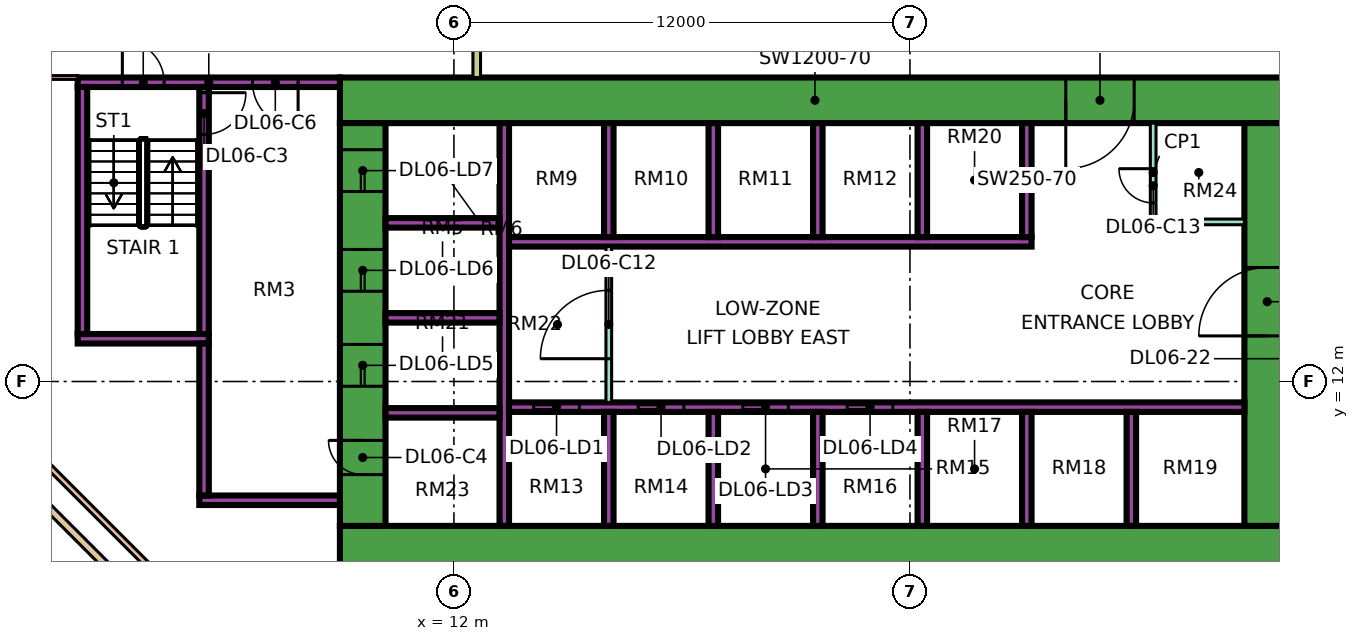
"""IFC4 building model, lengths in metres.
Left out: names, types, materials, properties, quantities, classifications, styles, units other than length and angle.
Written with IfcOpenShell. Run it as: python <this file> out.ifc"""

import sys

from ifc_helpers import new_model, si_unit, direction, frame, frame_2d, origin, place, context, subcontext, project, spatial, rectangle, extrude, element, fill, save


model = new_model("IFC4")
c1 = context("Model", 3, precision=1e-05, world=origin(), true_north=direction((0.0, 1.0)))
c2 = subcontext(c1, "Body", "Model", "MODEL_VIEW")
j1 = project(units=[si_unit("LENGTHUNIT", "METRE"), si_unit("PLANEANGLEUNIT", "RADIAN")], contexts=[c1])
p1 = place(None, origin())
s1 = spatial("IfcSite", under=j1, at=p1, CompositionType="ELEMENT")
p2 = place(p1, origin())
s2 = spatial("IfcBuilding", under=s1, at=p2, CompositionType="ELEMENT")
p3 = place(p2, frame((0.0, 0.0, 35.4)))
s3 = spatial("IfcBuildingStorey", under=s2, at=p3, CompositionType="ELEMENT", Elevation=35.4)
p4 = place(p3, frame((9.0, 7.6, 0.0), z_axis=(0.0, 0.0, 1.0), x_axis=(1.0, 0.0, 0.0)))
e1 = element("IfcWall", 1, at=p4, inside=s3, PredefinedType="SHEAR", context=c2, shape_type="SweptSolid", body=[
    extrude(rectangle(XDim=25.0, YDim=1.2, at=frame_2d((12.5, 0.0))), origin(), (0.0, 0.0, 1.0), 6.0),
])
p5 = place(p3, frame((9.0, 19.4, 0.0), z_axis=(0.0, 0.0, 1.0), x_axis=(1.0, 0.0, 0.0)))
e2 = element("IfcWall", 2, at=p5, inside=s3, PredefinedType="SHEAR", context=c2, shape_type="SweptSolid", body=[
    extrude(rectangle(XDim=25.0, YDim=1.2, at=frame_2d((12.5, 0.0))), origin(), (0.0, 0.0, 1.0), 6.0),
])
p6 = place(p5, frame((19.1, 0.0, 0.0)))
e3 = element("IfcOpeningElement", 3, at=p6, cuts=e2, PredefinedType="OPENING", context=c2, shape_type="SweptSolid", body=[
    extrude(rectangle(XDim=1.8, YDim=2.4, at=frame_2d((0.9, 1.2))), frame((0.0, 0.61, 0.0), z_axis=(0.0, -1.0, 0.0), x_axis=(1.0, 0.0, 0.0)), (0.0, 0.0, 1.0), 1.22),
])
p7 = place(p3, frame((9.6, 8.2, 0.0), z_axis=(0.0, 0.0, 1.0), x_axis=(0.0, 1.0, 0.0)))
e4 = element("IfcWall", 4, at=p7, inside=s3, PredefinedType="SHEAR", context=c2, shape_type="SweptSolid", body=[
    extrude(rectangle(XDim=10.6, YDim=1.2, at=frame_2d((5.3, 0.0))), origin(), (0.0, 0.0, 1.0), 6.0),
])
p8 = place(p7, frame((3.675, 0.0, 0.0)))
e5 = element("IfcOpeningElement", 5, at=p8, cuts=e4, PredefinedType="OPENING", context=c2, shape_type="SweptSolid", body=[
    extrude(rectangle(XDim=1.1, YDim=2.2, at=frame_2d((0.55, 1.1))), frame((0.0, 0.61, 0.0), z_axis=(0.0, -1.0, 0.0), x_axis=(1.0, 0.0, 0.0)), (0.0, 0.0, 1.0), 1.22),
])
p9 = place(p7, frame((6.175, 0.0, 0.0)))
e6 = element("IfcOpeningElement", 6, at=p9, cuts=e4, PredefinedType="OPENING", context=c2, shape_type="SweptSolid", body=[
    extrude(rectangle(XDim=1.1, YDim=2.2, at=frame_2d((0.55, 1.1))), frame((0.0, 0.61, 0.0), z_axis=(0.0, -1.0, 0.0), x_axis=(1.0, 0.0, 0.0)), (0.0, 0.0, 1.0), 1.22),
])
p10 = place(p7, frame((8.8, 0.0, 0.0)))
e7 = element("IfcOpeningElement", 7, at=p10, cuts=e4, PredefinedType="OPENING", context=c2, shape_type="SweptSolid", body=[
    extrude(rectangle(XDim=1.1, YDim=2.2, at=frame_2d((0.55, 1.1))), frame((0.0, 0.61, 0.0), z_axis=(0.0, -1.0, 0.0), x_axis=(1.0, 0.0, 0.0)), (0.0, 0.0, 1.0), 1.22),
])
p11 = place(p7, frame((1.35, 0.0, 0.0)))
e8 = element("IfcOpeningElement", 8, at=p11, cuts=e4, PredefinedType="OPENING", context=c2, shape_type="SweptSolid", body=[
    extrude(rectangle(XDim=0.9, YDim=2.1, at=frame_2d((0.45, 1.05))), frame((0.0, 0.61, 0.0), z_axis=(0.0, -1.0, 0.0), x_axis=(1.0, 0.0, 0.0)), (0.0, 0.0, 1.0), 1.22),
])
p12 = place(p3, frame((33.4, 8.2, 0.0), z_axis=(0.0, 0.0, 1.0), x_axis=(0.0, 1.0, 0.0)))
e9 = element("IfcWall", 9, at=p12, inside=s3, PredefinedType="SHEAR", context=c2, shape_type="SweptSolid", body=[
    extrude(rectangle(XDim=10.6, YDim=1.2, at=frame_2d((5.3, 0.0))), origin(), (0.0, 0.0, 1.0), 6.0),
])
p13 = place(p12, frame((5.0, 0.0, 0.0)))
e10 = element("IfcOpeningElement", 10, at=p13, cuts=e9, PredefinedType="OPENING", context=c2, shape_type="SweptSolid", body=[
    extrude(rectangle(XDim=1.8, YDim=2.4, at=frame_2d((0.9, 1.2))), frame((0.0, 0.61, 0.0), z_axis=(0.0, -1.0, 0.0), x_axis=(1.0, 0.0, 0.0)), (0.0, 0.0, 1.0), 1.22),
])
p14 = place(p3, frame((13.325, 8.2, 0.0), z_axis=(0.0, 0.0, 1.0), x_axis=(0.0, 1.0, 0.0)))
e11 = element("IfcWall", 11, at=p14, inside=s3, PredefinedType="SHEAR", context=c2, shape_type="SweptSolid", body=[
    extrude(rectangle(XDim=10.6, YDim=0.25, at=frame_2d((5.3, 0.0))), origin(), (0.0, 0.0, 1.0), 6.0),
])
p15 = place(p3, frame((13.45, 11.325, 0.0), z_axis=(0.0, 0.0, 1.0), x_axis=(1.0, 0.0, 0.0)))
e12 = element("IfcWall", 12, at=p15, inside=s3, PredefinedType="SHEAR", context=c2, shape_type="SweptSolid", body=[
    extrude(rectangle(XDim=19.35, YDim=0.25, at=frame_2d((9.675, 0.0))), origin(), (0.0, 0.0, 1.0), 6.0),
])
p16 = place(p15, frame((0.65, 0.0, 0.0)))
e13 = element("IfcOpeningElement", 13, at=p16, cuts=e12, PredefinedType="OPENING", context=c2, shape_type="SweptSolid", body=[
    extrude(rectangle(XDim=1.2, YDim=2.2, at=frame_2d((0.6, 1.1))), frame((0.0, 0.135, 0.0), z_axis=(0.0, -1.0, 0.0), x_axis=(1.0, 0.0, 0.0)), (0.0, 0.0, 1.0), 0.27),
])
p17 = place(p15, frame((3.4, 0.0, 0.0)))
e14 = element("IfcOpeningElement", 14, at=p17, cuts=e12, PredefinedType="OPENING", context=c2, shape_type="SweptSolid", body=[
    extrude(rectangle(XDim=1.2, YDim=2.2, at=frame_2d((0.6, 1.1))), frame((0.0, 0.135, 0.0), z_axis=(0.0, -1.0, 0.0), x_axis=(1.0, 0.0, 0.0)), (0.0, 0.0, 1.0), 0.27),
])
p18 = place(p15, frame((6.15, 0.0, 0.0)))
e15 = element("IfcOpeningElement", 15, at=p18, cuts=e12, PredefinedType="OPENING", context=c2, shape_type="SweptSolid", body=[
    extrude(rectangle(XDim=1.2, YDim=2.2, at=frame_2d((0.6, 1.1))), frame((0.0, 0.135, 0.0), z_axis=(0.0, -1.0, 0.0), x_axis=(1.0, 0.0, 0.0)), (0.0, 0.0, 1.0), 0.27),
])
p19 = place(p15, frame((8.9, 0.0, 0.0)))
e16 = element("IfcOpeningElement", 16, at=p19, cuts=e12, PredefinedType="OPENING", context=c2, shape_type="SweptSolid", body=[
    extrude(rectangle(XDim=1.2, YDim=2.2, at=frame_2d((0.6, 1.1))), frame((0.0, 0.135, 0.0), z_axis=(0.0, -1.0, 0.0), x_axis=(1.0, 0.0, 0.0)), (0.0, 0.0, 1.0), 0.27),
])
p20 = place(p3, frame((13.45, 15.675, 0.0), z_axis=(0.0, 0.0, 1.0), x_axis=(1.0, 0.0, 0.0)))
e17 = element("IfcWall", 17, at=p20, inside=s3, PredefinedType="SHEAR", context=c2, shape_type="SweptSolid", body=[
    extrude(rectangle(XDim=13.75, YDim=0.25, at=frame_2d((6.875, 0.0))), origin(), (0.0, 0.0, 1.0), 6.0),
])
for number, where, z_axis, x_axis in (
    (18, (10.2, 11.175, 0.0), (0.0, 0.0, 1.0), (1.0, 0.0, 0.0)),
    (19, (10.2, 13.675, 0.0), (0.0, 0.0, 1.0), (1.0, 0.0, 0.0)),
    (20, (10.2, 16.175, 0.0), (0.0, 0.0, 1.0), (1.0, 0.0, 0.0)),
    (21, (16.075, 8.2, 0.0), (0.0, 0.0, 1.0), (0.0, 1.0, 0.0)),
    (22, (18.825, 8.2, 0.0), (0.0, 0.0, 1.0), (0.0, 1.0, 0.0)),
    (23, (21.575, 8.2, 0.0), (0.0, 0.0, 1.0), (0.0, 1.0, 0.0)),
    (24, (24.325, 8.2, 0.0), (0.0, 0.0, 1.0), (0.0, 1.0, 0.0)),
    (25, (27.075, 8.2, 0.0), (0.0, 0.0, 1.0), (0.0, 1.0, 0.0)),
    (26, (29.825, 8.2, 0.0), (0.0, 0.0, 1.0), (0.0, 1.0, 0.0)),
    (27, (16.075, 15.8, 0.0), (0.0, 0.0, 1.0), (0.0, 1.0, 0.0)),
    (28, (18.825, 15.8, 0.0), (0.0, 0.0, 1.0), (0.0, 1.0, 0.0)),
    (29, (21.575, 15.8, 0.0), (0.0, 0.0, 1.0), (0.0, 1.0, 0.0)),
    (30, (24.325, 15.8, 0.0), (0.0, 0.0, 1.0), (0.0, 1.0, 0.0)),
    (31, (27.075, 15.8, 0.0), (0.0, 0.0, 1.0), (0.0, 1.0, 0.0)),
):
    element("IfcWall", number, at=place(p3, frame(where, z_axis=z_axis, x_axis=x_axis)), inside=s3, PredefinedType="SHEAR", context=c2, shape_type="SweptSolid", body=[
        extrude(rectangle(XDim=3.0, YDim=0.25, at=frame_2d((1.5, 0.0))), origin(), (0.0, 0.0, 1.0), 6.0),
    ])
p21 = place(p3, frame((2.1, 19.875, 0.0), z_axis=(0.0, 0.0, 1.0), x_axis=(1.0, 0.0, 0.0)))
e32 = element("IfcWall", 32, at=p21, inside=s3, PredefinedType="SHEAR", context=c2, shape_type="SweptSolid", body=[
    extrude(rectangle(XDim=6.9, YDim=0.25, at=frame_2d((3.45, 0.0))), origin(), (0.0, 0.0, 1.0), 6.0),
])
p22 = place(p21, frame((1.175, 0.0, 0.0)))
e33 = element("IfcOpeningElement", 33, at=p22, cuts=e32, PredefinedType="OPENING", context=c2, shape_type="SweptSolid", body=[
    extrude(rectangle(XDim=1.1, YDim=2.2, at=frame_2d((0.55, 1.1))), frame((0.0, 0.135, 0.0), z_axis=(0.0, -1.0, 0.0), x_axis=(1.0, 0.0, 0.0)), (0.0, 0.0, 1.0), 0.27),
])
p23 = place(p21, frame((4.6, 0.0, 0.0)))
e34 = element("IfcOpeningElement", 34, at=p23, cuts=e32, PredefinedType="OPENING", context=c2, shape_type="SweptSolid", body=[
    extrude(rectangle(XDim=1.2, YDim=2.2, at=frame_2d((0.6, 1.1))), frame((0.0, 0.135, 0.0), z_axis=(0.0, -1.0, 0.0), x_axis=(1.0, 0.0, 0.0)), (0.0, 0.0, 1.0), 0.27),
])
p24 = place(p3, frame((2.1, 13.125, 0.0), z_axis=(0.0, 0.0, 1.0), x_axis=(1.0, 0.0, 0.0)))
e35 = element("IfcWall", 35, at=p24, inside=s3, PredefinedType="SHEAR", context=c2, shape_type="SweptSolid", body=[
    extrude(rectangle(XDim=3.45, YDim=0.25, at=frame_2d((1.725, 0.0))), origin(), (0.0, 0.0, 1.0), 6.0),
])
p25 = place(p3, frame((2.225, 13.25, 0.0), z_axis=(0.0, 0.0, 1.0), x_axis=(0.0, 1.0, 0.0)))
e36 = element("IfcWall", 36, at=p25, inside=s3, PredefinedType="SHEAR", context=c2, shape_type="SweptSolid", body=[
    extrude(rectangle(XDim=6.5, YDim=0.25, at=frame_2d((3.25, 0.0))), origin(), (0.0, 0.0, 1.0), 6.0),
])
p26 = place(p3, frame((5.425, 13.25, 0.0), z_axis=(0.0, 0.0, 1.0), x_axis=(0.0, 1.0, 0.0)))
e37 = element("IfcWall", 37, at=p26, inside=s3, PredefinedType="SHEAR", context=c2, shape_type="SweptSolid", body=[
    extrude(rectangle(XDim=6.5, YDim=0.25, at=frame_2d((3.25, 0.0))), origin(), (0.0, 0.0, 1.0), 6.0),
])
p27 = place(p26, frame((5.25, 0.0, 0.0)))
e38 = element("IfcOpeningElement", 38, at=p27, cuts=e37, PredefinedType="OPENING", context=c2, shape_type="SweptSolid", body=[
    extrude(rectangle(XDim=1.1, YDim=2.2, at=frame_2d((0.55, 1.1))), frame((0.0, 0.135, 0.0), z_axis=(0.0, -1.0, 0.0), x_axis=(1.0, 0.0, 0.0)), (0.0, 0.0, 1.0), 0.27),
])
p28 = place(p3, frame((5.3, 8.875, 0.0), z_axis=(0.0, 0.0, 1.0), x_axis=(1.0, 0.0, 0.0)))
e39 = element("IfcWall", 39, at=p28, inside=s3, PredefinedType="SHEAR", context=c2, shape_type="SweptSolid", body=[
    extrude(rectangle(XDim=3.7, YDim=0.25, at=frame_2d((1.85, 0.0))), origin(), (0.0, 0.0, 1.0), 6.0),
])
p29 = place(p3, frame((5.425, 9.0, 0.0), z_axis=(0.0, 0.0, 1.0), x_axis=(0.0, 1.0, 0.0)))
e40 = element("IfcWall", 40, at=p29, inside=s3, PredefinedType="SHEAR", context=c2, shape_type="SweptSolid", body=[
    extrude(rectangle(XDim=4.0, YDim=0.25, at=frame_2d((2.0, 0.0))), origin(), (0.0, 0.0, 1.0), 6.0),
])
p30 = place(p3, frame((-1.447, 12.553, 0.0), z_axis=(0.0, 0.0, 1.0), x_axis=(0.707106781187, -0.707106781187, 0.0)))
e41 = element("IfcWall", 41, at=p30, inside=s3, PredefinedType="SOLIDWALL", context=c2, shape_type="SweptSolid", body=[
    extrude(rectangle(XDim=19.799, YDim=0.15, at=frame_2d((9.899, 0.0))), origin(), (0.0, 0.0, 1.0), 5.6),
])
p31 = place(p30, frame((8.399, 0.0, 0.45)))
e42 = element("IfcOpeningElement", 42, at=p31, cuts=e41, PredefinedType="OPENING", context=c2, shape_type="SweptSolid", body=[
    extrude(rectangle(XDim=3.0, YDim=3.6, at=frame_2d((1.5, 1.8))), frame((0.0, 0.085, 0.0), z_axis=(0.0, -1.0, 0.0), x_axis=(1.0, 0.0, 0.0)), (0.0, 0.0, 1.0), 0.17),
])
p32 = place(p3, frame((12.21, -2.2, 0.0), z_axis=(0.0, 0.0, 1.0), x_axis=(-0.707106781187, 0.707106781187, 0.0)))
e43 = element("IfcWall", 43, at=p32, inside=s3, PredefinedType="PARAPET", context=c2, shape_type="SweptSolid", body=[
    extrude(rectangle(XDim=20.379, YDim=0.2, at=frame_2d((10.189, 0.0))), origin(), (0.0, 0.0, 1.0), 0.5),
])
p33 = place(p3, frame((16.075, 11.45, 0.0), z_axis=(0.0, 0.0, 1.0), x_axis=(0.0, 1.0, 0.0)))
e44 = element("IfcWall", 44, at=p33, inside=s3, PredefinedType="PARTITIONING", context=c2, shape_type="SweptSolid", body=[
    extrude(rectangle(XDim=4.1, YDim=0.15, at=frame_2d((2.05, 0.0))), origin(), (0.0, 0.0, 1.0), 5.6),
])
p34 = place(p33, frame((1.15, 0.0, 0.0)))
e45 = element("IfcOpeningElement", 45, at=p34, cuts=e44, PredefinedType="OPENING", context=c2, shape_type="SweptSolid", body=[
    extrude(rectangle(XDim=1.8, YDim=2.4, at=frame_2d((0.9, 1.2))), frame((0.0, 0.085, 0.0), z_axis=(0.0, -1.0, 0.0), x_axis=(1.0, 0.0, 0.0)), (0.0, 0.0, 1.0), 0.17),
])
p35 = place(p3, frame((30.4, 16.2, 0.0), z_axis=(0.0, 0.0, 1.0), x_axis=(0.0, 1.0, 0.0)))
e46 = element("IfcWall", 46, at=p35, inside=s3, PredefinedType="PARTITIONING", context=c2, shape_type="SweptSolid", body=[
    extrude(rectangle(XDim=2.6, YDim=0.15, at=frame_2d((1.3, 0.0))), origin(), (0.0, 0.0, 1.0), 5.6),
])
p36 = place(p35, frame((0.5, 0.0, 0.0)))
e47 = element("IfcOpeningElement", 47, at=p36, cuts=e46, PredefinedType="OPENING", context=c2, shape_type="SweptSolid", body=[
    extrude(rectangle(XDim=0.9, YDim=2.1, at=frame_2d((0.45, 1.05))), frame((0.0, 0.085, 0.0), z_axis=(0.0, -1.0, 0.0), x_axis=(1.0, 0.0, 0.0)), (0.0, 0.0, 1.0), 0.17),
])
p37 = place(p3, frame((30.4, 16.2, 0.0), z_axis=(0.0, 0.0, 1.0), x_axis=(1.0, 0.0, 0.0)))
e48 = element("IfcWall", 48, at=p37, inside=s3, PredefinedType="PARTITIONING", context=c2, shape_type="SweptSolid", body=[
    extrude(rectangle(XDim=2.4, YDim=0.15, at=frame_2d((1.2, 0.0))), origin(), (0.0, 0.0, 1.0), 5.6),
])
p38 = place(p3, frame((-1.351, 20.0, 0.0), z_axis=(0.0, 0.0, 1.0), x_axis=(1.0, 0.0, 0.0)))
e49 = element("IfcWall", 49, at=p38, inside=s3, PredefinedType="PARTITIONING", context=c2, shape_type="SweptSolid", body=[
    extrude(rectangle(XDim=3.451, YDim=0.1, at=frame_2d((1.726, 0.0))), origin(), (0.0, 0.0, 1.0), 5.6),
])
p39 = place(p3, frame((12.6, 20.0, 0.0), z_axis=(0.0, 0.0, 1.0), x_axis=(0.0, 1.0, 0.0)))
e50 = element("IfcWall", 50, at=p39, inside=s3, PredefinedType="PARTITIONING", context=c2, shape_type="SweptSolid", body=[
    extrude(rectangle(XDim=6.0, YDim=0.2, at=frame_2d((3.0, 0.0))), origin(), (0.0, 0.0, 1.0), 5.6),
])
p40 = place(p39, frame((4.85, 0.0, 0.0)))
e51 = element("IfcOpeningElement", 51, at=p40, cuts=e50, PredefinedType="OPENING", context=c2, shape_type="SweptSolid", body=[
    extrude(rectangle(XDim=1.0, YDim=2.1, at=frame_2d((0.5, 1.05))), frame((0.0, 0.11, 0.0), z_axis=(0.0, -1.0, 0.0), x_axis=(1.0, 0.0, 0.0)), (0.0, 0.0, 1.0), 0.22),
])
p41 = place(p39, frame((1.1, 0.0, 0.0)))
e52 = element("IfcOpeningElement", 52, at=p41, cuts=e50, PredefinedType="OPENING", context=c2, shape_type="SweptSolid", body=[
    extrude(rectangle(XDim=1.0, YDim=2.1, at=frame_2d((0.5, 1.05))), frame((0.0, 0.11, 0.0), z_axis=(0.0, -1.0, 0.0), x_axis=(1.0, 0.0, 0.0)), (0.0, 0.0, 1.0), 0.22),
])
p42 = place(p16, origin())
e53 = element("IfcDoor", 53, at=p42, inside=s3, OperationType="DOUBLE_DOOR_SLIDING", PredefinedType="DOOR", context=c2, shape_type="SweptSolid", body=[
    extrude(rectangle(XDim=1.2, YDim=2.2, at=frame_2d((0.6, 1.1))), frame((0.0, 0.025, 0.0), z_axis=(0.0, -1.0, 0.0), x_axis=(1.0, 0.0, 0.0)), (0.0, 0.0, 1.0), 0.05),
])
fill(e13, e53)
p43 = place(p17, origin())
e54 = element("IfcDoor", 54, at=p43, inside=s3, OperationType="DOUBLE_DOOR_SLIDING", PredefinedType="DOOR", context=c2, shape_type="SweptSolid", body=[
    extrude(rectangle(XDim=1.2, YDim=2.2, at=frame_2d((0.6, 1.1))), frame((0.0, 0.025, 0.0), z_axis=(0.0, -1.0, 0.0), x_axis=(1.0, 0.0, 0.0)), (0.0, 0.0, 1.0), 0.05),
])
fill(e14, e54)
p44 = place(p18, origin())
e55 = element("IfcDoor", 55, at=p44, inside=s3, OperationType="DOUBLE_DOOR_SLIDING", PredefinedType="DOOR", context=c2, shape_type="SweptSolid", body=[
    extrude(rectangle(XDim=1.2, YDim=2.2, at=frame_2d((0.6, 1.1))), frame((0.0, 0.025, 0.0), z_axis=(0.0, -1.0, 0.0), x_axis=(1.0, 0.0, 0.0)), (0.0, 0.0, 1.0), 0.05),
])
fill(e15, e55)
p45 = place(p19, origin())
e56 = element("IfcDoor", 56, at=p45, inside=s3, OperationType="DOUBLE_DOOR_SLIDING", PredefinedType="DOOR", context=c2, shape_type="SweptSolid", body=[
    extrude(rectangle(XDim=1.2, YDim=2.2, at=frame_2d((0.6, 1.1))), frame((0.0, 0.025, 0.0), z_axis=(0.0, -1.0, 0.0), x_axis=(1.0, 0.0, 0.0)), (0.0, 0.0, 1.0), 0.05),
])
fill(e16, e56)
p46 = place(p8, origin())
e57 = element("IfcDoor", 57, at=p46, inside=s3, OperationType="DOUBLE_DOOR_SLIDING", PredefinedType="DOOR", context=c2, shape_type="SweptSolid", body=[
    extrude(rectangle(XDim=1.1, YDim=2.2, at=frame_2d((0.55, 1.1))), frame((0.0, 0.025, 0.0), z_axis=(0.0, -1.0, 0.0), x_axis=(1.0, 0.0, 0.0)), (0.0, 0.0, 1.0), 0.05),
])
fill(e5, e57)
p47 = place(p9, origin())
e58 = element("IfcDoor", 58, at=p47, inside=s3, OperationType="DOUBLE_DOOR_SLIDING", PredefinedType="DOOR", context=c2, shape_type="SweptSolid", body=[
    extrude(rectangle(XDim=1.1, YDim=2.2, at=frame_2d((0.55, 1.1))), frame((0.0, 0.025, 0.0), z_axis=(0.0, -1.0, 0.0), x_axis=(1.0, 0.0, 0.0)), (0.0, 0.0, 1.0), 0.05),
])
fill(e6, e58)
p48 = place(p10, origin())
e59 = element("IfcDoor", 59, at=p48, inside=s3, OperationType="DOUBLE_DOOR_SLIDING", PredefinedType="DOOR", context=c2, shape_type="SweptSolid", body=[
    extrude(rectangle(XDim=1.1, YDim=2.2, at=frame_2d((0.55, 1.1))), frame((0.0, 0.025, 0.0), z_axis=(0.0, -1.0, 0.0), x_axis=(1.0, 0.0, 0.0)), (0.0, 0.0, 1.0), 0.05),
])
fill(e7, e59)
p49 = place(p13, origin())
e60 = element("IfcDoor", 60, at=p49, inside=s3, OperationType="DOUBLE_DOOR_SINGLE_SWING", PredefinedType="DOOR", context=c2, shape_type="SweptSolid", body=[
    extrude(rectangle(XDim=1.8, YDim=2.4, at=frame_2d((0.9, 1.2))), frame((0.0, 0.025, 0.0), z_axis=(0.0, -1.0, 0.0), x_axis=(1.0, 0.0, 0.0)), (0.0, 0.0, 1.0), 0.05),
])
fill(e10, e60)
p50 = place(p6, frame((1.8, 0.0, 0.0), z_axis=(0.0, 0.0, 1.0), x_axis=(-1.0, 0.0, 0.0)))
e61 = element("IfcDoor", 61, at=p50, inside=s3, OperationType="DOUBLE_DOOR_SINGLE_SWING", PredefinedType="DOOR", context=c2, shape_type="SweptSolid", body=[
    extrude(rectangle(XDim=1.8, YDim=2.4, at=frame_2d((0.9, 1.2))), frame((0.0, 0.025, 0.0), z_axis=(0.0, -1.0, 0.0), x_axis=(1.0, 0.0, 0.0)), (0.0, 0.0, 1.0), 0.05),
])
fill(e3, e61)
p51 = place(p27, origin())
e62 = element("IfcDoor", 62, at=p51, inside=s3, OperationType="SINGLE_SWING_RIGHT", PredefinedType="DOOR", context=c2, shape_type="SweptSolid", body=[
    extrude(rectangle(XDim=1.1, YDim=2.2, at=frame_2d((0.55, 1.1))), frame((0.0, 0.025, 0.0), z_axis=(0.0, -1.0, 0.0), x_axis=(1.0, 0.0, 0.0)), (0.0, 0.0, 1.0), 0.05),
])
fill(e38, e62)
p52 = place(p11, frame((0.9, 0.0, 0.0), z_axis=(0.0, 0.0, 1.0), x_axis=(-1.0, 0.0, 0.0)))
e63 = element("IfcDoor", 63, at=p52, inside=s3, OperationType="SINGLE_SWING_RIGHT", PredefinedType="DOOR", context=c2, shape_type="SweptSolid", body=[
    extrude(rectangle(XDim=0.9, YDim=2.1, at=frame_2d((0.45, 1.05))), frame((0.0, 0.025, 0.0), z_axis=(0.0, -1.0, 0.0), x_axis=(1.0, 0.0, 0.0)), (0.0, 0.0, 1.0), 0.05),
])
fill(e8, e63)
p53 = place(p22, origin())
e64 = element("IfcDoor", 64, at=p53, inside=s3, OperationType="SINGLE_SWING_LEFT", PredefinedType="DOOR", context=c2, shape_type="SweptSolid", body=[
    extrude(rectangle(XDim=1.1, YDim=2.2, at=frame_2d((0.55, 1.1))), frame((0.0, 0.025, 0.0), z_axis=(0.0, -1.0, 0.0), x_axis=(1.0, 0.0, 0.0)), (0.0, 0.0, 1.0), 0.05),
])
fill(e33, e64)
p54 = place(p23, origin())
e65 = element("IfcDoor", 65, at=p54, inside=s3, OperationType="SINGLE_SWING_RIGHT", PredefinedType="DOOR", context=c2, shape_type="SweptSolid", body=[
    extrude(rectangle(XDim=1.2, YDim=2.2, at=frame_2d((0.6, 1.1))), frame((0.0, 0.025, 0.0), z_axis=(0.0, -1.0, 0.0), x_axis=(1.0, 0.0, 0.0)), (0.0, 0.0, 1.0), 0.05),
])
fill(e34, e65)
p55 = place(p34, origin())
e66 = element("IfcDoor", 66, at=p55, inside=s3, OperationType="DOUBLE_DOOR_SINGLE_SWING", PredefinedType="DOOR", context=c2, shape_type="SweptSolid", body=[
    extrude(rectangle(XDim=1.8, YDim=2.4, at=frame_2d((0.9, 1.2))), frame((0.0, 0.025, 0.0), z_axis=(0.0, -1.0, 0.0), x_axis=(1.0, 0.0, 0.0)), (0.0, 0.0, 1.0), 0.05),
])
fill(e45, e66)
p56 = place(p36, frame((0.9, 0.0, 0.0), z_axis=(0.0, 0.0, 1.0), x_axis=(-1.0, 0.0, 0.0)))
e67 = element("IfcDoor", 67, at=p56, inside=s3, OperationType="SINGLE_SWING_RIGHT", PredefinedType="DOOR", context=c2, shape_type="SweptSolid", body=[
    extrude(rectangle(XDim=0.9, YDim=2.1, at=frame_2d((0.45, 1.05))), frame((0.0, 0.025, 0.0), z_axis=(0.0, -1.0, 0.0), x_axis=(1.0, 0.0, 0.0)), (0.0, 0.0, 1.0), 0.05),
])
fill(e47, e67)
save(model, sys.argv[1])
